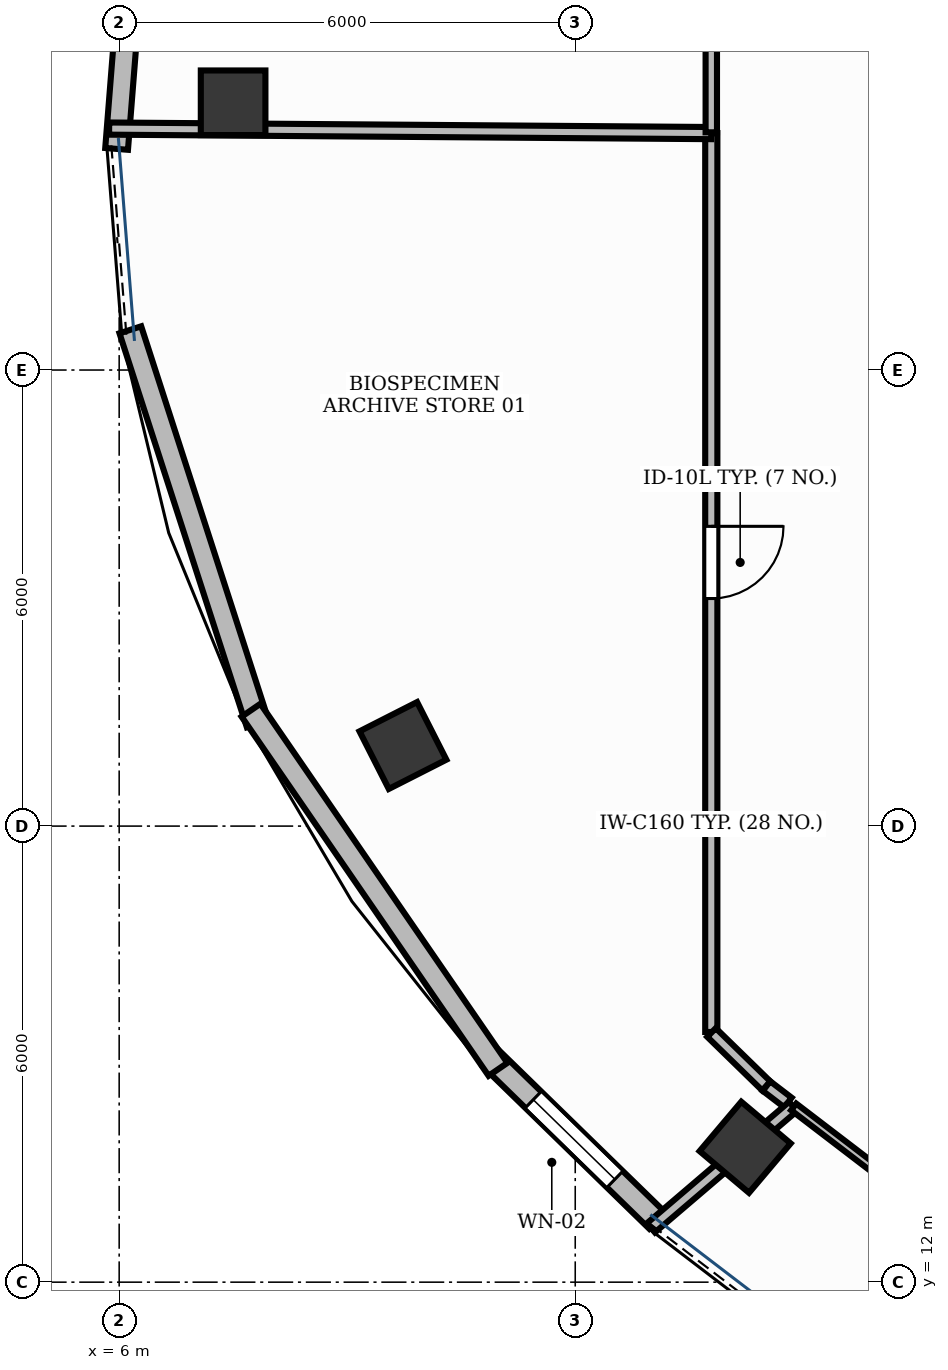
"""IFC4 building model, lengths in metres.
Left out: names, types, materials, properties, quantities, classifications, styles, units other than length and angle.
Written with IfcOpenShell. Run it as: python <this file> out.ifc"""

import sys

from ifc_helpers import new_model, si_unit, direction, frame, frame_2d, origin, origin_2d, place, context, subcontext, project, spatial, rectangle, extrude, element, fill, save


model = new_model("IFC4")
c1 = context("Model", 3, precision=1e-05, world=origin(), true_north=direction((0.0, 1.0)))
c2 = subcontext(c1, "Body", "Model", "MODEL_VIEW")
j1 = project(units=[si_unit("LENGTHUNIT", "METRE"), si_unit("PLANEANGLEUNIT", "RADIAN")], contexts=[c1])
p1 = place(None, origin())
s1 = spatial("IfcSite", under=j1, at=p1, CompositionType="ELEMENT")
p2 = place(p1, origin())
s2 = spatial("IfcBuilding", under=s1, at=p2, CompositionType="ELEMENT")
p3 = place(p2, frame((0.0, 0.0, 243.6)))
s3 = spatial("IfcBuildingStorey", under=s2, at=p3, CompositionType="ELEMENT", Elevation=243.6)
for number, where, z_axis, x_axis in (
    (1, (7.499, 27.516, -0.0), (0.0, 0.0, 1.0), (0.0, 1.0, 0.0)),
    (2, (9.733, 19.06, -0.0), (0.0, 0.0, 1.0), (-0.453, 0.891, 0.0)),
    (3, (14.235, 13.775, -0.0), (0.0, 0.0, 1.0), (-0.764, 0.645, 0.0)),
):
    element("IfcColumn", number, at=place(p3, frame(where, z_axis=z_axis, x_axis=x_axis)), inside=s3, PredefinedType="COLUMN", context=c2, shape_type="SweptSolid", body=[
        extrude(rectangle(XDim=0.85, YDim=0.85, at=origin_2d()), origin(), (0.0, 0.0, 1.0), 3.901),
    ])
p4 = place(p3, frame((10.892, 14.943, 0.0), z_axis=(0.0, 0.0, 1.0), x_axis=(0.716005135245, -0.698095012375, 0.0)))
e4 = element("IfcWall", 4, at=p4, inside=s3, PredefinedType="STANDARD", context=c2, shape_type="SweptSolid", body=[
    extrude(rectangle(XDim=3.053, YDim=0.3, at=frame_2d((1.527, 0.0))), origin(), (0.0, 0.0, 1.0), 3.9),
])
p5 = place(p4, frame((0.777, 0.0, 0.95)))
e5 = element("IfcOpeningElement", 5, at=p5, cuts=e4, PredefinedType="OPENING", context=c2, shape_type="SweptSolid", body=[
    extrude(rectangle(XDim=1.5, YDim=1.8, at=frame_2d((0.75, 0.9))), frame((0.0, 0.165, 0.0), z_axis=(0.0, -1.0, 0.0), x_axis=(1.0, 0.0, 0.0)), (0.0, 0.0, 1.0), 0.33),
])
p6 = place(p3, frame((6.184, 29.659, 0.0), z_axis=(0.0, 0.0, 1.0), x_axis=(-0.079045093233, -0.996871041427, 0.0)))
e6 = element("IfcWall", 6, at=p6, inside=s3, PredefinedType="STANDARD", context=c2, shape_type="SweptSolid", body=[
    extrude(rectangle(XDim=2.758, YDim=0.3, at=frame_2d((1.379, 0.0))), origin(), (0.0, 0.0, 1.0), 3.47),
])
p7 = place(p3, frame((6.147, 24.529, 0.0), z_axis=(0.0, 0.0, 1.0), x_axis=(0.307501658213, -0.951547544895, 0.0)))
e7 = element("IfcWall", 7, at=p7, inside=s3, PredefinedType="STANDARD", context=c2, shape_type="SweptSolid", body=[
    extrude(rectangle(XDim=5.447, YDim=0.3, at=frame_2d((2.724, 0.0))), origin(), (0.0, 0.0, 1.0), 3.9),
])
p8 = place(p3, frame((7.735, 19.524, 0.0), z_axis=(0.0, 0.0, 1.0), x_axis=(0.566669772846, -0.823945003349, 0.0)))
e8 = element("IfcWall", 8, at=p8, inside=s3, PredefinedType="STANDARD", context=c2, shape_type="SweptSolid", body=[
    extrude(rectangle(XDim=5.734, YDim=0.3, at=frame_2d((2.867, 0.0))), origin(), (0.0, 0.0, 1.0), 3.9),
])
p9 = place(p3, frame((13.79, 27.117, 0.0), z_axis=(0.0, 0.0, 1.0), x_axis=(0.0, -1.0, 0.0)))
e9 = element("IfcWall", 9, at=p9, inside=s3, PredefinedType="PARTITIONING", context=c2, shape_type="SweptSolid", body=[
    extrude(rectangle(XDim=11.826, YDim=0.16, at=frame_2d((5.913, 0.0))), origin(), (0.0, 0.0, 1.0), 2.91),
])
p10 = place(p9, frame((5.174, 0.0, 0.0)))
e10 = element("IfcOpeningElement", 10, at=p10, cuts=e9, PredefinedType="OPENING", context=c2, shape_type="SweptSolid", body=[
    extrude(rectangle(XDim=0.95, YDim=2.15, at=frame_2d((0.475, 1.075))), frame((0.0, 0.095, 0.0), z_axis=(0.0, -1.0, 0.0), x_axis=(1.0, 0.0, 0.0)), (0.0, 0.0, 1.0), 0.19),
])
p11 = place(p3, frame((5.868, 27.177, 0.0), z_axis=(0.0, 0.0, 1.0), x_axis=(0.999971961056, -0.007488464561, 0.0)))
e11 = element("IfcWall", 11, at=p11, inside=s3, PredefinedType="PARTITIONING", context=c2, shape_type="SweptSolid", body=[
    extrude(rectangle(XDim=7.922, YDim=0.16, at=frame_2d((3.961, 0.0))), origin(), (0.0, 0.0, 1.0), 2.91),
])
p12 = place(p3, frame((13.793, 15.284, 0.0), z_axis=(0.0, 0.0, 1.0), x_axis=(0.7160122468, -0.698087718294, 0.0)))
e12 = element("IfcWall", 12, at=p12, inside=s3, PredefinedType="PARTITIONING", context=c2, shape_type="SweptSolid", body=[
    extrude(rectangle(XDim=1.008, YDim=0.16, at=frame_2d((0.504, 0.0))), origin(), (0.0, 0.0, 1.0), 2.91),
])
p13 = place(p3, frame((14.516, 14.58, 0.0), z_axis=(0.0, 0.0, 1.0), x_axis=(0.794124394036, -0.607755252381, 0.0)))
e13 = element("IfcWall", 13, at=p13, inside=s3, PredefinedType="PARTITIONING", context=c2, shape_type="SweptSolid", body=[
    extrude(rectangle(XDim=0.356, YDim=0.16, at=frame_2d((0.178, 0.0))), origin(), (0.0, 0.0, 1.0), 2.91),
])
p14 = place(p3, frame((14.866, 14.312, 0.0), z_axis=(0.0, 0.0, 1.0), x_axis=(-0.760432930585, -0.649416475062, 0.0)))
e14 = element("IfcWall", 14, at=p14, inside=s3, PredefinedType="PARTITIONING", context=c2, shape_type="SweptSolid", body=[
    extrude(rectangle(XDim=2.459, YDim=0.16, at=frame_2d((1.229, 0.0))), origin(), (0.0, 0.0, 1.0), 2.91),
])
p15 = place(p3, frame((14.874, 14.306, 0.0), z_axis=(0.0, 0.0, 1.0), x_axis=(0.794366882066, -0.607438273965, 0.0)))
e15 = element("IfcWall", 15, at=p15, inside=s3, PredefinedType="MOVABLE", context=c2, shape_type="SweptSolid", body=[
    extrude(rectangle(XDim=2.297, YDim=0.11, at=frame_2d((1.149, 0.0))), origin(), (0.0, 0.0, 1.0), 2.91),
])
p16 = place(p3, frame((13.79, 28.39, 0.0), z_axis=(0.0, 0.0, 1.0), x_axis=(0.0, -1.0, 0.0)))
e16 = element("IfcWall", 16, at=p16, inside=s3, PredefinedType="PARTITIONING", context=c2, shape_type="SweptSolid", body=[
    extrude(rectangle(XDim=1.263, YDim=0.15, at=frame_2d((0.631, 0.0))), origin(), (0.0, 0.0, 1.0), 2.91),
])
p17 = place(p5, origin())
e17 = element("IfcWindow", 17, at=p17, inside=s3, PartitioningType="DOUBLE_PANEL_VERTICAL", PredefinedType="WINDOW", context=c2, shape_type="SweptSolid", body=[
    extrude(rectangle(XDim=1.5, YDim=1.8, at=frame_2d((0.75, 0.9))), frame((0.0, 0.03, 0.0), z_axis=(0.0, -1.0, 0.0), x_axis=(1.0, 0.0, 0.0)), (0.0, 0.0, 1.0), 0.06),
])
fill(e5, e17)
p18 = place(p10, origin())
e18 = element("IfcDoor", 18, at=p18, inside=s3, OperationType="SINGLE_SWING_LEFT", PredefinedType="DOOR", context=c2, shape_type="SweptSolid", body=[
    extrude(rectangle(XDim=0.95, YDim=2.15, at=frame_2d((0.475, 1.075))), frame((0.0, 0.025, 0.0), z_axis=(0.0, -1.0, 0.0), x_axis=(1.0, 0.0, 0.0)), (0.0, 0.0, 1.0), 0.05),
])
fill(e10, e18)
save(model, sys.argv[1])
